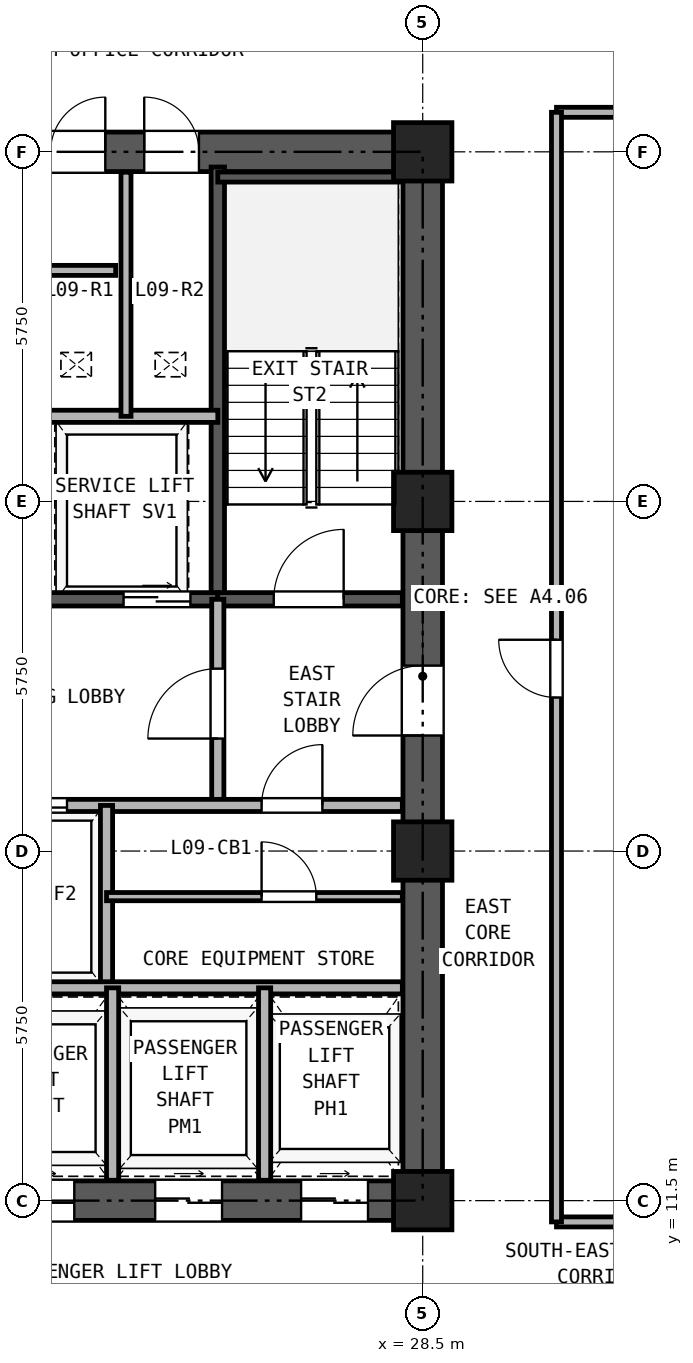
"""IFC4 building model, lengths in metres.
Left out: names, types, materials, properties, quantities, classifications, styles, units other than length and angle.
Written with IfcOpenShell. Run it as: python <this file> out.ifc"""

import sys

from ifc_helpers import new_model, si_unit, direction, frame, frame_2d, origin, origin_2d, place, context, subcontext, project, spatial, rectangle, hollow_rectangle, extrude, source, transform, mapped, element, fill, save


model = new_model("IFC4")
c1 = context("Model", 3, precision=1e-05, world=origin(), true_north=direction((0.0, 1.0)))
c2 = subcontext(c1, "Body", "Model", "MODEL_VIEW")
j1 = project(units=[si_unit("LENGTHUNIT", "METRE"), si_unit("PLANEANGLEUNIT", "RADIAN")], contexts=[c1])
p1 = place(None, origin())
s1 = spatial("IfcSite", under=j1, at=p1, CompositionType="ELEMENT")
p2 = place(p1, origin())
s2 = spatial("IfcBuilding", under=s1, at=p2, CompositionType="ELEMENT")
p3 = place(p2, frame((0.0, 0.0, 36.9)))
s3 = spatial("IfcBuildingStorey", under=s2, at=p3, CompositionType="ELEMENT", Elevation=36.9)
m1 = source(origin(), c2, "Body", "SweptSolid", [
    extrude(hollow_rectangle(XDim=0.96, YDim=0.96, WallThickness=0.06, at=origin_2d()), origin(), (0.0, 0.0, 1.0), 3.32),
])
for number, where, z_axis, x_axis in (
    (1, (28.5, 11.5, 0.0), (0.0, 0.0, 1.0), (1.0, 0.0, 0.0)),
    (2, (28.5, 17.25, 0.0), (0.0, 0.0, 1.0), (1.0, 0.0, 0.0)),
    (3, (28.5, 23.0, 0.0), (0.0, 0.0, 1.0), (1.0, 0.0, 0.0)),
    (4, (28.5, 28.75, 0.0), (0.0, 0.0, 1.0), (1.0, 0.0, 0.0)),
):
    element("IfcColumn", number, at=place(p3, frame(where, z_axis=z_axis, x_axis=x_axis)), inside=s3, PredefinedType="COLUMN", context=c2, shape_type="MappedRepresentation", body=[
        mapped(m1, transform((0.0, 0.0, 0.0), x_axis=(1.0, 0.0, 0.0), y_axis=(0.0, 1.0, 0.0), z_axis=(0.0, 0.0, 1.0), scale=1.0)),
    ])
p4 = place(p3, frame((18.175, 11.5, 0.0), z_axis=(0.0, 0.0, 1.0), x_axis=(1.0, 0.0, 0.0)))
e5 = element("IfcWall", 5, at=p4, inside=s3, PredefinedType="SHEAR", context=c2, shape_type="SweptSolid", body=[
    extrude(rectangle(XDim=10.65, YDim=0.65, at=frame_2d((5.325, 0.0))), origin(), (0.0, 0.0, 1.0), 3.32),
])
p5 = place(p4, frame((1.195, 0.0, 0.0)))
e6 = element("IfcOpeningElement", 6, at=p5, cuts=e5, PredefinedType="OPENING", context=c2, shape_type="SweptSolid", body=[
    extrude(rectangle(XDim=1.1, YDim=2.25, at=frame_2d((0.55, 1.125))), frame((0.0, 0.335, 0.0), z_axis=(0.0, -1.0, 0.0), x_axis=(1.0, 0.0, 0.0)), (0.0, 0.0, 1.0), 0.67),
])
p6 = place(p4, frame((3.495, 0.0, 0.0)))
e7 = element("IfcOpeningElement", 7, at=p6, cuts=e5, PredefinedType="OPENING", context=c2, shape_type="SweptSolid", body=[
    extrude(rectangle(XDim=1.1, YDim=2.25, at=frame_2d((0.55, 1.125))), frame((0.0, 0.335, 0.0), z_axis=(0.0, -1.0, 0.0), x_axis=(1.0, 0.0, 0.0)), (0.0, 0.0, 1.0), 0.67),
])
p7 = place(p4, frame((5.925, 0.0, 0.0)))
e8 = element("IfcOpeningElement", 8, at=p7, cuts=e5, PredefinedType="OPENING", context=c2, shape_type="SweptSolid", body=[
    extrude(rectangle(XDim=1.1, YDim=2.25, at=frame_2d((0.55, 1.125))), frame((0.0, 0.335, 0.0), z_axis=(0.0, -1.0, 0.0), x_axis=(1.0, 0.0, 0.0)), (0.0, 0.0, 1.0), 0.67),
])
p8 = place(p4, frame((8.325, 0.0, 0.0)))
e9 = element("IfcOpeningElement", 9, at=p8, cuts=e5, PredefinedType="OPENING", context=c2, shape_type="SweptSolid", body=[
    extrude(rectangle(XDim=1.1, YDim=2.25, at=frame_2d((0.55, 1.125))), frame((0.0, 0.335, 0.0), z_axis=(0.0, -1.0, 0.0), x_axis=(1.0, 0.0, 0.0)), (0.0, 0.0, 1.0), 0.67),
])
p9 = place(p3, frame((18.175, 28.75, 0.0), z_axis=(0.0, 0.0, 1.0), x_axis=(1.0, 0.0, 0.0)))
e10 = element("IfcWall", 10, at=p9, inside=s3, PredefinedType="SHEAR", context=c2, shape_type="SweptSolid", body=[
    extrude(rectangle(XDim=10.65, YDim=0.65, at=frame_2d((5.325, 0.0))), origin(), (0.0, 0.0, 1.0), 3.32),
])
p10 = place(p9, frame((4.205, 0.0, 0.0)))
e11 = element("IfcOpeningElement", 11, at=p10, cuts=e10, PredefinedType="OPENING", context=c2, shape_type="SweptSolid", body=[
    extrude(rectangle(XDim=0.9, YDim=2.05, at=frame_2d((0.45, 1.025))), frame((0.0, 0.335, 0.0), z_axis=(0.0, -1.0, 0.0), x_axis=(1.0, 0.0, 0.0)), (0.0, 0.0, 1.0), 0.67),
])
p11 = place(p9, frame((5.745, 0.0, 0.0)))
e12 = element("IfcOpeningElement", 12, at=p11, cuts=e10, PredefinedType="OPENING", context=c2, shape_type="SweptSolid", body=[
    extrude(rectangle(XDim=0.9, YDim=2.05, at=frame_2d((0.45, 1.025))), frame((0.0, 0.335, 0.0), z_axis=(0.0, -1.0, 0.0), x_axis=(1.0, 0.0, 0.0)), (0.0, 0.0, 1.0), 0.67),
])
p12 = place(p3, frame((28.5, 11.825, 0.0), z_axis=(0.0, 0.0, 1.0), x_axis=(0.0, 1.0, 0.0)))
e13 = element("IfcWall", 13, at=p12, inside=s3, PredefinedType="SHEAR", context=c2, shape_type="SweptSolid", body=[
    extrude(rectangle(XDim=16.6, YDim=0.65, at=frame_2d((8.3, 0.0))), origin(), (0.0, 0.0, 1.0), 3.32),
])
p13 = place(p12, frame((7.325, 0.0, 0.0)))
e14 = element("IfcOpeningElement", 14, at=p13, cuts=e13, PredefinedType="OPENING", context=c2, shape_type="SweptSolid", body=[
    extrude(rectangle(XDim=1.15, YDim=2.2, at=frame_2d((0.575, 1.1))), frame((0.0, 0.335, 0.0), z_axis=(0.0, -1.0, 0.0), x_axis=(1.0, 0.0, 0.0)), (0.0, 0.0, 1.0), 0.67),
])
p14 = place(p3, frame((25.13, 21.39, 0.0), z_axis=(0.0, 0.0, 1.0), x_axis=(0.0, 1.0, 0.0)))
e15 = element("IfcWall", 15, at=p14, inside=s3, PredefinedType="SOLIDWALL", context=c2, shape_type="SweptSolid", body=[
    extrude(rectangle(XDim=7.11, YDim=0.22, at=frame_2d((3.555, 0.0))), origin(), (0.0, 0.0, 1.0), 3.32),
])
p15 = place(p3, frame((25.13, 28.335, 0.0), z_axis=(0.0, 0.0, 1.0), x_axis=(1.0, 0.0, 0.0)))
e16 = element("IfcWall", 16, at=p15, inside=s3, PredefinedType="PARTITIONING", context=c2, shape_type="SweptSolid", body=[
    extrude(rectangle(XDim=3.035, YDim=0.165, at=frame_2d((1.518, 0.0))), origin(), (0.0, 0.0, 1.0), 3.32),
])
p16 = place(p3, frame((18.835, 21.39, 0.0), z_axis=(0.0, 0.0, 1.0), x_axis=(1.0, 0.0, 0.0)))
e17 = element("IfcWall", 17, at=p16, inside=s3, PredefinedType="SOLIDWALL", context=c2, shape_type="SweptSolid", body=[
    extrude(rectangle(XDim=6.295, YDim=0.22, at=frame_2d((3.147, 0.0))), origin(), (0.0, 0.0, 1.0), 3.32),
])
p17 = place(p16, frame((1.015, 0.0, 0.0)))
e18 = element("IfcOpeningElement", 18, at=p17, cuts=e17, PredefinedType="OPENING", context=c2, shape_type="SweptSolid", body=[
    extrude(rectangle(XDim=1.15, YDim=2.2, at=frame_2d((0.575, 1.1))), frame((0.0, 0.12, 0.0), z_axis=(0.0, -1.0, 0.0), x_axis=(1.0, 0.0, 0.0)), (0.0, 0.0, 1.0), 0.24),
])
p18 = place(p16, frame((4.745, 0.0, 0.0)))
e19 = element("IfcOpeningElement", 19, at=p18, cuts=e17, PredefinedType="OPENING", context=c2, shape_type="SweptSolid", body=[
    extrude(rectangle(XDim=1.1, YDim=2.25, at=frame_2d((0.55, 1.125))), frame((0.0, 0.12, 0.0), z_axis=(0.0, -1.0, 0.0), x_axis=(1.0, 0.0, 0.0)), (0.0, 0.0, 1.0), 0.24),
])
p19 = place(p3, frame((25.13, 21.39, 0.0), z_axis=(0.0, 0.0, 1.0), x_axis=(1.0, 0.0, 0.0)))
e20 = element("IfcWall", 20, at=p19, inside=s3, PredefinedType="SOLIDWALL", context=c2, shape_type="SweptSolid", body=[
    extrude(rectangle(XDim=3.035, YDim=0.22, at=frame_2d((1.518, 0.0))), origin(), (0.0, 0.0, 1.0), 3.32),
])
p20 = place(p19, frame((0.92, 0.0, 0.0)))
e21 = element("IfcOpeningElement", 21, at=p20, cuts=e20, PredefinedType="OPENING", context=c2, shape_type="SweptSolid", body=[
    extrude(rectangle(XDim=1.15, YDim=2.2, at=frame_2d((0.575, 1.1))), frame((0.0, 0.12, 0.0), z_axis=(0.0, -1.0, 0.0), x_axis=(1.0, 0.0, 0.0)), (0.0, 0.0, 1.0), 0.24),
])
p21 = place(p3, frame((22.11, 24.4, 0.0), z_axis=(0.0, 0.0, 1.0), x_axis=(1.0, 0.0, 0.0)))
e22 = element("IfcWall", 22, at=p21, inside=s3, PredefinedType="PARTITIONING", context=c2, shape_type="SweptSolid", body=[
    extrude(rectangle(XDim=3.02, YDim=0.2, at=frame_2d((1.51, 0.0))), origin(), (0.0, 0.0, 1.0), 3.32),
])
p22 = place(p3, frame((23.62, 24.4, 0.0), z_axis=(0.0, 0.0, 1.0), x_axis=(0.0, 1.0, 0.0)))
e23 = element("IfcWall", 23, at=p22, inside=s3, PredefinedType="PARTITIONING", context=c2, shape_type="SweptSolid", body=[
    extrude(rectangle(XDim=4.015, YDim=0.165, at=frame_2d((2.008, 0.0))), origin(), (0.0, 0.0, 1.0), 3.32),
])
p23 = place(p3, frame((25.13, 18.0, 0.0), z_axis=(0.0, 0.0, 1.0), x_axis=(0.0, 1.0, 0.0)))
e24 = element("IfcWall", 24, at=p23, inside=s3, PredefinedType="PARTITIONING", context=c2, shape_type="SweptSolid", body=[
    extrude(rectangle(XDim=3.39, YDim=0.2, at=frame_2d((1.695, 0.0))), origin(), (0.0, 0.0, 1.0), 3.32),
])
p24 = place(p23, frame((1.1, 0.0, 0.0)))
e25 = element("IfcOpeningElement", 25, at=p24, cuts=e24, PredefinedType="OPENING", context=c2, shape_type="SweptSolid", body=[
    extrude(rectangle(XDim=1.15, YDim=2.2, at=frame_2d((0.575, 1.1))), frame((0.0, 0.11, 0.0), z_axis=(0.0, -1.0, 0.0), x_axis=(1.0, 0.0, 0.0)), (0.0, 0.0, 1.0), 0.22),
])
p25 = place(p3, frame((18.835, 18.0, 0.0), z_axis=(0.0, 0.0, 1.0), x_axis=(1.0, 0.0, 0.0)))
e26 = element("IfcWall", 26, at=p25, inside=s3, PredefinedType="PARTITIONING", context=c2, shape_type="SweptSolid", body=[
    extrude(rectangle(XDim=9.33, YDim=0.2, at=frame_2d((4.665, 0.0))), origin(), (0.0, 0.0, 1.0), 3.32),
])
p26 = place(p25, frame((0.415, 0.0, 0.0)))
e27 = element("IfcOpeningElement", 27, at=p26, cuts=e26, PredefinedType="OPENING", context=c2, shape_type="SweptSolid", body=[
    extrude(rectangle(XDim=1.3, YDim=2.3, at=frame_2d((0.65, 1.15))), frame((0.0, 0.11, 0.0), z_axis=(0.0, -1.0, 0.0), x_axis=(1.0, 0.0, 0.0)), (0.0, 0.0, 1.0), 0.22),
])
p27 = place(p25, frame((2.515, 0.0, 0.0)))
e28 = element("IfcOpeningElement", 28, at=p27, cuts=e26, PredefinedType="OPENING", context=c2, shape_type="SweptSolid", body=[
    extrude(rectangle(XDim=1.3, YDim=2.3, at=frame_2d((0.65, 1.15))), frame((0.0, 0.11, 0.0), z_axis=(0.0, -1.0, 0.0), x_axis=(1.0, 0.0, 0.0)), (0.0, 0.0, 1.0), 0.22),
])
p28 = place(p25, frame((7.015, 0.0, 0.0)))
e29 = element("IfcOpeningElement", 29, at=p28, cuts=e26, PredefinedType="OPENING", context=c2, shape_type="SweptSolid", body=[
    extrude(rectangle(XDim=1.0, YDim=2.15, at=frame_2d((0.5, 1.075))), frame((0.0, 0.11, 0.0), z_axis=(0.0, -1.0, 0.0), x_axis=(1.0, 0.0, 0.0)), (0.0, 0.0, 1.0), 0.22),
])
p29 = place(p3, frame((23.3, 15.0, 0.0), z_axis=(0.0, 0.0, 1.0), x_axis=(0.0, 1.0, 0.0)))
e30 = element("IfcWall", 30, at=p29, inside=s3, PredefinedType="PARTITIONING", context=c2, shape_type="SweptSolid", body=[
    extrude(rectangle(XDim=3.0, YDim=0.2, at=frame_2d((1.5, 0.0))), origin(), (0.0, 0.0, 1.0), 3.32),
])
p30 = place(p3, frame((18.835, 15.0, 0.0), z_axis=(0.0, 0.0, 1.0), x_axis=(1.0, 0.0, 0.0)))
e31 = element("IfcWall", 31, at=p30, inside=s3, PredefinedType="PARTITIONING", context=c2, shape_type="SweptSolid", body=[
    extrude(rectangle(XDim=9.33, YDim=0.2, at=frame_2d((4.665, 0.0))), origin(), (0.0, 0.0, 1.0), 3.32),
])
p31 = place(p3, frame((23.3, 16.5, 0.0), z_axis=(0.0, 0.0, 1.0), x_axis=(1.0, 0.0, 0.0)))
e32 = element("IfcWall", 32, at=p31, inside=s3, PredefinedType="PARTITIONING", context=c2, shape_type="SweptSolid", body=[
    extrude(rectangle(XDim=4.865, YDim=0.135, at=frame_2d((2.433, 0.0))), origin(), (0.0, 0.0, 1.0), 3.32),
])
p32 = place(p31, frame((2.55, 0.0, 0.0)))
e33 = element("IfcOpeningElement", 33, at=p32, cuts=e32, PredefinedType="OPENING", context=c2, shape_type="SweptSolid", body=[
    extrude(rectangle(XDim=0.9, YDim=2.05, at=frame_2d((0.45, 1.025))), frame((0.0, 0.077, 0.0), z_axis=(0.0, -1.0, 0.0), x_axis=(1.0, 0.0, 0.0)), (0.0, 0.0, 1.0), 0.155),
])
for number, where, z_axis, x_axis in (
    (34, (23.4, 11.835, 0.0), (0.0, 0.0, 1.0), (0.0, 1.0, 0.0)),
    (35, (25.9, 11.835, 0.0), (0.0, 0.0, 1.0), (0.0, 1.0, 0.0)),
):
    element("IfcWall", number, at=place(p3, frame(where, z_axis=z_axis, x_axis=x_axis)), inside=s3, PredefinedType="PARTITIONING", context=c2, shape_type="SweptSolid", body=[
        extrude(rectangle(XDim=3.165, YDim=0.2, at=frame_2d((1.583, 0.0))), origin(), (0.0, 0.0, 1.0), 3.32),
    ])
for number, where, z_axis, x_axis in (
    (36, (30.7, 11.15, 0.0), (0.0, 0.0, 1.0), (1.0, 0.0, 0.0)),
    (37, (30.7, 29.4, 0.0), (0.0, 0.0, 1.0), (1.0, 0.0, 0.0)),
):
    element("IfcWall", number, at=place(p3, frame(where, z_axis=z_axis, x_axis=x_axis)), inside=s3, PredefinedType="PARTITIONING", context=c2, shape_type="SweptSolid", body=[
        extrude(rectangle(XDim=8.9, YDim=0.165, at=frame_2d((4.45, 0.0))), origin(), (0.0, 0.0, 1.0), 3.32),
    ])
p33 = place(p3, frame((30.7, 11.15, 0.0), z_axis=(0.0, 0.0, 1.0), x_axis=(0.0, 1.0, 0.0)))
e38 = element("IfcWall", 38, at=p33, inside=s3, PredefinedType="PARTITIONING", context=c2, shape_type="SweptSolid", body=[
    extrude(rectangle(XDim=18.25, YDim=0.165, at=frame_2d((9.125, 0.0))), origin(), (0.0, 0.0, 1.0), 3.32),
])
p34 = place(p33, frame((8.625, 0.0, 0.0)))
e39 = element("IfcOpeningElement", 39, at=p34, cuts=e38, PredefinedType="OPENING", context=c2, shape_type="SweptSolid", body=[
    extrude(rectangle(XDim=0.95, YDim=2.15, at=frame_2d((0.475, 1.075))), frame((0.0, 0.093, 0.0), z_axis=(0.0, -1.0, 0.0), x_axis=(1.0, 0.0, 0.0)), (0.0, 0.0, 1.0), 0.185),
])
p35 = place(p3, frame((22.35, 26.8, 0.0), z_axis=(0.0, 0.0, 1.0), x_axis=(1.0, 0.0, 0.0)))
e40 = element("IfcWall", 40, at=p35, inside=s3, PredefinedType="PARTITIONING", context=c2, shape_type="SweptSolid", body=[
    extrude(rectangle(XDim=1.1, YDim=0.165, at=frame_2d((0.55, 0.0))), origin(), (0.0, 0.0, 1.0), 3.32),
])
p36 = place(p20, frame((1.15, 0.0, 0.0), z_axis=(0.0, 0.0, 1.0), x_axis=(-1.0, 0.0, 0.0)))
e41 = element("IfcDoor", 41, at=p36, inside=s3, OperationType="SINGLE_SWING_RIGHT", PredefinedType="DOOR", context=c2, shape_type="SweptSolid", body=[
    extrude(rectangle(XDim=1.15, YDim=2.2, at=frame_2d((0.575, 1.1))), frame((0.0, 0.025, 0.0), z_axis=(0.0, -1.0, 0.0), x_axis=(1.0, 0.0, 0.0)), (0.0, 0.0, 1.0), 0.05),
])
fill(e21, e41)
p37 = place(p18, frame((1.1, 0.0, 0.0), z_axis=(0.0, 0.0, 1.0), x_axis=(-1.0, 0.0, 0.0)))
e42 = element("IfcDoor", 42, at=p37, inside=s3, OperationType="DOUBLE_DOOR_SLIDING", PredefinedType="DOOR", context=c2, shape_type="SweptSolid", body=[
    extrude(rectangle(XDim=1.1, YDim=2.25, at=frame_2d((0.55, 1.125))), frame((0.0, 0.025, 0.0), z_axis=(0.0, -1.0, 0.0), x_axis=(1.0, 0.0, 0.0)), (0.0, 0.0, 1.0), 0.05),
])
fill(e19, e42)
p38 = place(p24, origin())
e43 = element("IfcDoor", 43, at=p38, inside=s3, OperationType="SINGLE_SWING_LEFT", PredefinedType="DOOR", context=c2, shape_type="SweptSolid", body=[
    extrude(rectangle(XDim=1.15, YDim=2.2, at=frame_2d((0.575, 1.1))), frame((0.0, 0.025, 0.0), z_axis=(0.0, -1.0, 0.0), x_axis=(1.0, 0.0, 0.0)), (0.0, 0.0, 1.0), 0.05),
])
fill(e25, e43)
p39 = place(p27, origin())
e44 = element("IfcDoor", 44, at=p39, inside=s3, OperationType="DOUBLE_DOOR_SLIDING", PredefinedType="DOOR", context=c2, shape_type="SweptSolid", body=[
    extrude(rectangle(XDim=1.3, YDim=2.3, at=frame_2d((0.65, 1.15))), frame((0.0, 0.025, 0.0), z_axis=(0.0, -1.0, 0.0), x_axis=(1.0, 0.0, 0.0)), (0.0, 0.0, 1.0), 0.05),
])
fill(e28, e44)
p40 = place(p28, frame((1.0, 0.0, 0.0), z_axis=(0.0, 0.0, 1.0), x_axis=(-1.0, 0.0, 0.0)))
e45 = element("IfcDoor", 45, at=p40, inside=s3, OperationType="SINGLE_SWING_RIGHT", PredefinedType="DOOR", context=c2, shape_type="SweptSolid", body=[
    extrude(rectangle(XDim=1.0, YDim=2.15, at=frame_2d((0.5, 1.075))), frame((0.0, 0.025, 0.0), z_axis=(0.0, -1.0, 0.0), x_axis=(1.0, 0.0, 0.0)), (0.0, 0.0, 1.0), 0.05),
])
fill(e29, e45)
p41 = place(p32, frame((0.9, 0.0, 0.0), z_axis=(0.0, 0.0, 1.0), x_axis=(-1.0, 0.0, 0.0)))
e46 = element("IfcDoor", 46, at=p41, inside=s3, OperationType="SINGLE_SWING_LEFT", PredefinedType="DOOR", context=c2, shape_type="SweptSolid", body=[
    extrude(rectangle(XDim=0.9, YDim=2.05, at=frame_2d((0.45, 1.025))), frame((0.0, 0.025, 0.0), z_axis=(0.0, -1.0, 0.0), x_axis=(1.0, 0.0, 0.0)), (0.0, 0.0, 1.0), 0.05),
])
fill(e33, e46)
p42 = place(p13, origin())
e47 = element("IfcDoor", 47, at=p42, inside=s3, OperationType="SINGLE_SWING_LEFT", PredefinedType="DOOR", context=c2, shape_type="SweptSolid", body=[
    extrude(rectangle(XDim=1.15, YDim=2.2, at=frame_2d((0.575, 1.1))), frame((0.0, 0.025, 0.0), z_axis=(0.0, -1.0, 0.0), x_axis=(1.0, 0.0, 0.0)), (0.0, 0.0, 1.0), 0.05),
])
fill(e14, e47)
p43 = place(p10, origin())
e48 = element("IfcDoor", 48, at=p43, inside=s3, OperationType="SINGLE_SWING_RIGHT", PredefinedType="DOOR", context=c2, shape_type="SweptSolid", body=[
    extrude(rectangle(XDim=0.9, YDim=2.05, at=frame_2d((0.45, 1.025))), frame((0.0, 0.025, 0.0), z_axis=(0.0, -1.0, 0.0), x_axis=(1.0, 0.0, 0.0)), (0.0, 0.0, 1.0), 0.05),
])
fill(e11, e48)
p44 = place(p11, origin())
e49 = element("IfcDoor", 49, at=p44, inside=s3, OperationType="SINGLE_SWING_LEFT", PredefinedType="DOOR", context=c2, shape_type="SweptSolid", body=[
    extrude(rectangle(XDim=0.9, YDim=2.05, at=frame_2d((0.45, 1.025))), frame((0.0, 0.025, 0.0), z_axis=(0.0, -1.0, 0.0), x_axis=(1.0, 0.0, 0.0)), (0.0, 0.0, 1.0), 0.05),
])
fill(e12, e49)
p45 = place(p6, frame((1.1, 0.0, 0.0), z_axis=(0.0, 0.0, 1.0), x_axis=(-1.0, 0.0, 0.0)))
e50 = element("IfcDoor", 50, at=p45, inside=s3, OperationType="DOUBLE_DOOR_SLIDING", PredefinedType="DOOR", context=c2, shape_type="SweptSolid", body=[
    extrude(rectangle(XDim=1.1, YDim=2.25, at=frame_2d((0.55, 1.125))), frame((0.0, 0.025, 0.0), z_axis=(0.0, -1.0, 0.0), x_axis=(1.0, 0.0, 0.0)), (0.0, 0.0, 1.0), 0.05),
])
fill(e7, e50)
p46 = place(p7, frame((1.1, 0.0, 0.0), z_axis=(0.0, 0.0, 1.0), x_axis=(-1.0, 0.0, 0.0)))
e51 = element("IfcDoor", 51, at=p46, inside=s3, OperationType="DOUBLE_DOOR_SLIDING", PredefinedType="DOOR", context=c2, shape_type="SweptSolid", body=[
    extrude(rectangle(XDim=1.1, YDim=2.25, at=frame_2d((0.55, 1.125))), frame((0.0, 0.025, 0.0), z_axis=(0.0, -1.0, 0.0), x_axis=(1.0, 0.0, 0.0)), (0.0, 0.0, 1.0), 0.05),
])
fill(e8, e51)
p47 = place(p8, frame((1.1, 0.0, 0.0), z_axis=(0.0, 0.0, 1.0), x_axis=(-1.0, 0.0, 0.0)))
e52 = element("IfcDoor", 52, at=p47, inside=s3, OperationType="DOUBLE_DOOR_SLIDING", PredefinedType="DOOR", context=c2, shape_type="SweptSolid", body=[
    extrude(rectangle(XDim=1.1, YDim=2.25, at=frame_2d((0.55, 1.125))), frame((0.0, 0.025, 0.0), z_axis=(0.0, -1.0, 0.0), x_axis=(1.0, 0.0, 0.0)), (0.0, 0.0, 1.0), 0.05),
])
fill(e9, e52)
p48 = place(p34, origin())
e53 = element("IfcDoor", 53, at=p48, inside=s3, OperationType="SINGLE_SWING_RIGHT", PredefinedType="DOOR", context=c2, shape_type="SweptSolid", body=[
    extrude(rectangle(XDim=0.95, YDim=2.15, at=frame_2d((0.475, 1.075))), frame((0.0, 0.025, 0.0), z_axis=(0.0, -1.0, 0.0), x_axis=(1.0, 0.0, 0.0)), (0.0, 0.0, 1.0), 0.05),
])
fill(e39, e53)
save(model, sys.argv[1])
